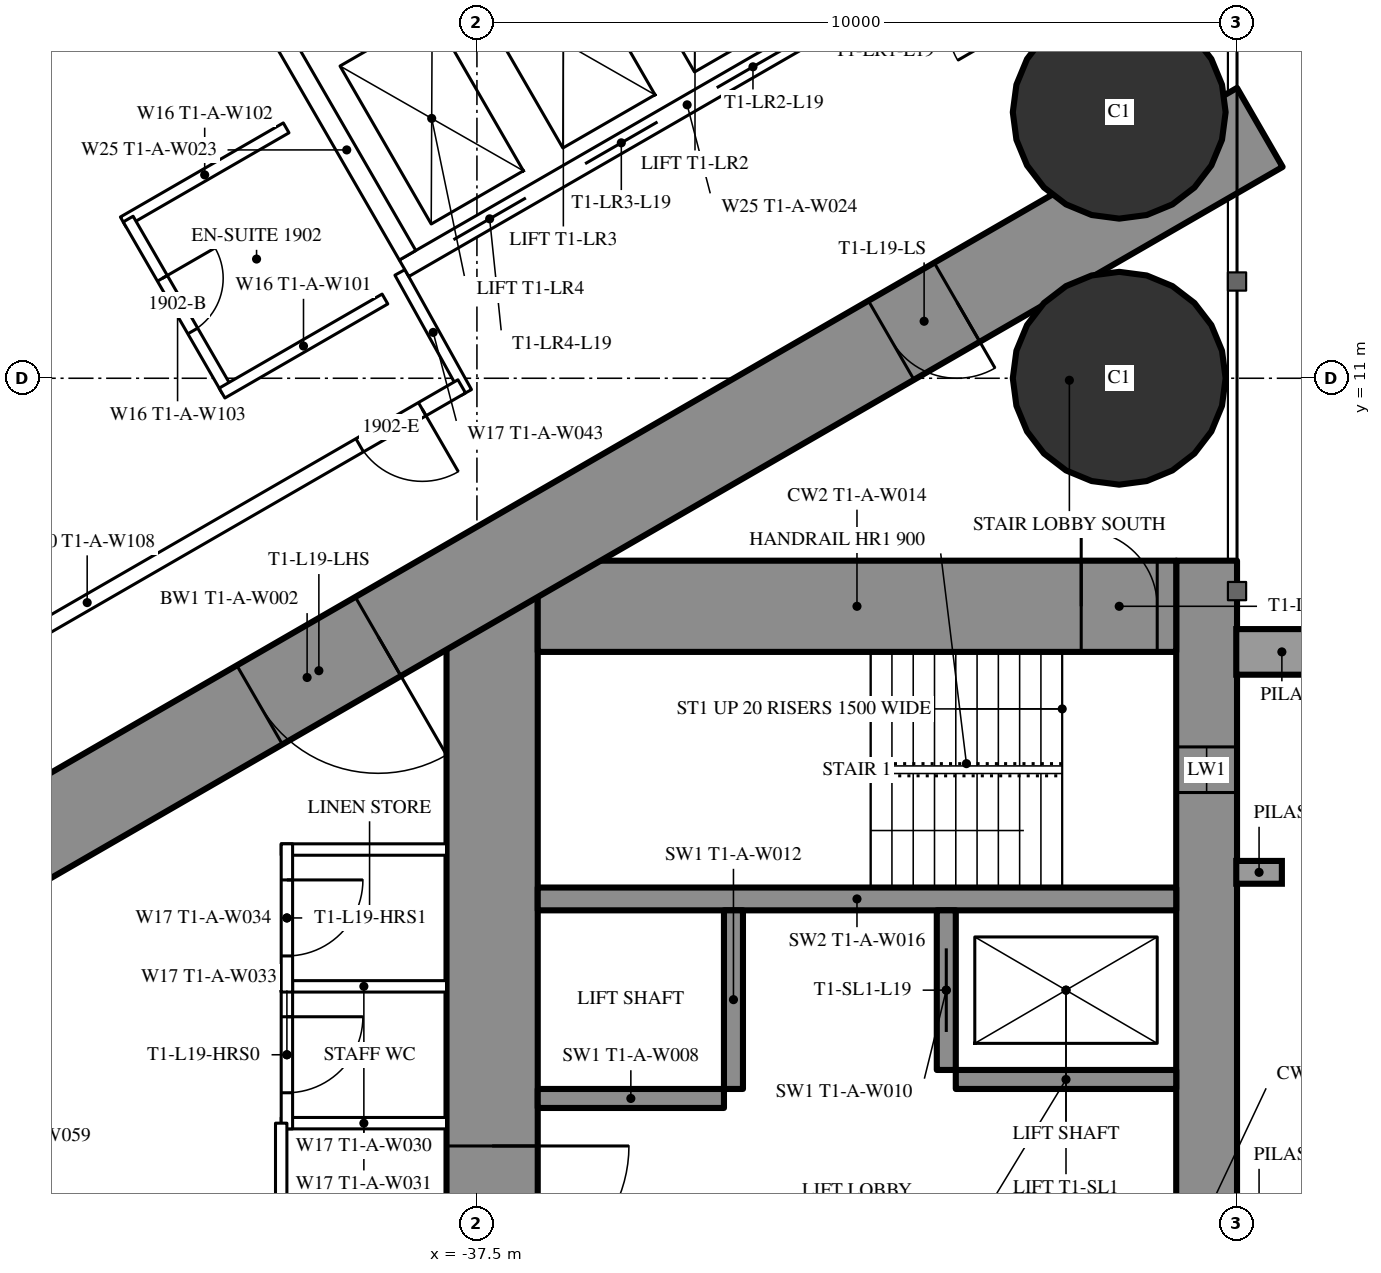
"""IFC4 building model, lengths in metres.
Left out: names, types, materials, properties, quantities, classifications, styles, units other than length and angle.
Written with IfcOpenShell. Run it as: python <this file> out.ifc"""

import sys

from ifc_helpers import new_model, si_unit, direction, frame, frame_2d, origin, origin_2d, place, context, subcontext, project, spatial, rectangle, hollow_circle, extrude, element, fill, save


model = new_model("IFC4")
c1 = context("Model", 3, precision=1e-05, world=origin(), true_north=direction((0.0, 1.0)))
c2 = subcontext(c1, "Body", "Model", "MODEL_VIEW")
j1 = project(units=[si_unit("LENGTHUNIT", "METRE"), si_unit("PLANEANGLEUNIT", "RADIAN")], contexts=[c1])
p1 = place(None, origin())
s1 = spatial("IfcSite", under=j1, at=p1, CompositionType="ELEMENT")
p2 = place(p1, origin())
s2 = spatial("IfcBuilding", under=s1, at=p2, CompositionType="ELEMENT")
p3 = place(p2, frame((0.0, 0.0, 74.0)))
s3 = spatial("IfcBuildingStorey", under=s2, at=p3, CompositionType="ELEMENT", Elevation=74.0)
for number, where, z_axis, x_axis in (
    (1, (-29.05, 11.0, 0.0), (0.0, 0.0, 1.0), (1.0, 0.0, 0.0)),
    (2, (-29.05, 14.5, 0.0), (0.0, 0.0, 1.0), (1.0, 0.0, 0.0)),
):
    element("IfcColumn", number, at=place(p3, frame(where, z_axis=z_axis, x_axis=x_axis)), inside=s3, PredefinedType="COLUMN", context=c2, shape_type="SweptSolid", body=[
        extrude(hollow_circle(Radius=1.4, WallThickness=0.12, at=origin_2d()), origin(), (0.0, 0.0, 1.0), 3.5),
    ])
p4 = place(p3, frame((-27.9, 8.6, 0.0), z_axis=(0.0, 0.0, 1.0), x_axis=(0.0, -1.0, 0.0)))
e3 = element("IfcWall", 3, at=p4, inside=s3, PredefinedType="SHEAR", context=c2, shape_type="SweptSolid", body=[
    extrude(rectangle(XDim=17.2, YDim=0.8, at=frame_2d((8.6, 0.0))), origin(), (0.0, 0.0, 1.0), 3.5),
])
p5 = place(p4, frame((2.45, 0.0, 0.6)))
e4 = element("IfcOpeningElement", 4, at=p5, cuts=e3, PredefinedType="OPENING", context=c2, shape_type="SweptSolid", body=[
    extrude(rectangle(XDim=0.6, YDim=2.1, at=frame_2d((0.3, 1.05))), frame((0.0, 0.41, 0.0), z_axis=(0.0, -1.0, 0.0), x_axis=(1.0, 0.0, 0.0)), (0.0, 0.0, 1.0), 0.82),
])
p6 = place(p4, frame((14.15, 0.0, 0.6)))
e5 = element("IfcOpeningElement", 5, at=p6, cuts=e3, PredefinedType="OPENING", context=c2, shape_type="SweptSolid", body=[
    extrude(rectangle(XDim=0.6, YDim=2.1, at=frame_2d((0.3, 1.05))), frame((0.0, 0.41, 0.0), z_axis=(0.0, -1.0, 0.0), x_axis=(1.0, 0.0, 0.0)), (0.0, 0.0, 1.0), 0.82),
])
p7 = place(p3, frame((-37.3, 8.6, 0.0), z_axis=(0.0, 0.0, 1.0), x_axis=(0.0, -1.0, 0.0)))
e6 = element("IfcWall", 6, at=p7, inside=s3, PredefinedType="SHEAR", context=c2, shape_type="SweptSolid", body=[
    extrude(rectangle(XDim=17.2, YDim=1.2, at=frame_2d((8.6, 0.0))), origin(), (0.0, 0.0, 1.0), 3.5),
])
p8 = place(p7, frame((7.7, 0.0, 0.0)))
e7 = element("IfcOpeningElement", 7, at=p8, cuts=e6, PredefinedType="OPENING", context=c2, shape_type="SweptSolid", body=[
    extrude(rectangle(XDim=1.8, YDim=2.2, at=frame_2d((0.9, 1.1))), frame((0.0, 0.61, 0.0), z_axis=(0.0, -1.0, 0.0), x_axis=(1.0, 0.0, 0.0)), (0.0, 0.0, 1.0), 1.22),
])
p9 = place(p3, frame((-28.3, 8.0, 0.0), z_axis=(0.0, 0.0, 1.0), x_axis=(-1.0, 0.0, 0.0)))
e8 = element("IfcWall", 8, at=p9, inside=s3, PredefinedType="SHEAR", context=c2, shape_type="SweptSolid", body=[
    extrude(rectangle(XDim=8.4, YDim=1.2, at=frame_2d((4.2, 0.0))), origin(), (0.0, 0.0, 1.0), 3.5),
])
p10 = place(p9, frame((0.25, 0.0, 0.0)))
e9 = element("IfcOpeningElement", 9, at=p10, cuts=e8, PredefinedType="OPENING", context=c2, shape_type="SweptSolid", body=[
    extrude(rectangle(XDim=1.0, YDim=2.2, at=frame_2d((0.5, 1.1))), frame((0.0, 0.61, 0.0), z_axis=(0.0, -1.0, 0.0), x_axis=(1.0, 0.0, 0.0)), (0.0, 0.0, 1.0), 1.22),
])
p11 = place(p3, frame((-28.3, 4.15, 0.0), z_axis=(0.0, 0.0, 1.0), x_axis=(-1.0, 0.0, 0.0)))
e10 = element("IfcWall", 10, at=p11, inside=s3, PredefinedType="SHEAR", context=c2, shape_type="SweptSolid", body=[
    extrude(rectangle(XDim=8.4, YDim=0.3, at=frame_2d((4.2, 0.0))), origin(), (0.0, 0.0, 1.0), 3.5),
])
p12 = place(p3, frame((-31.325, 4.0, 0.0), z_axis=(0.0, 0.0, 1.0), x_axis=(0.0, -1.0, 0.0)))
e11 = element("IfcWall", 11, at=p12, inside=s3, PredefinedType="SHEAR", context=c2, shape_type="SweptSolid", body=[
    extrude(rectangle(XDim=2.1, YDim=0.25, at=frame_2d((1.05, 0.0))), origin(), (0.0, 0.0, 1.0), 3.5),
])
p13 = place(p12, frame((0.5, 0.0, 0.0)))
e12 = element("IfcOpeningElement", 12, at=p13, cuts=e11, PredefinedType="OPENING", context=c2, shape_type="SweptSolid", body=[
    extrude(rectangle(XDim=1.1, YDim=2.2, at=frame_2d((0.55, 1.1))), frame((0.0, 0.135, 0.0), z_axis=(0.0, -1.0, 0.0), x_axis=(1.0, 0.0, 0.0)), (0.0, 0.0, 1.0), 0.27),
])
p14 = place(p3, frame((-34.125, 4.0, 0.0), z_axis=(0.0, 0.0, 1.0), x_axis=(0.0, -1.0, 0.0)))
e13 = element("IfcWall", 13, at=p14, inside=s3, PredefinedType="SHEAR", context=c2, shape_type="SweptSolid", body=[
    extrude(rectangle(XDim=2.35, YDim=0.25, at=frame_2d((1.175, 0.0))), origin(), (0.0, 0.0, 1.0), 3.5),
])
p15 = place(p3, frame((-28.3, 1.775, 0.0), z_axis=(0.0, 0.0, 1.0), x_axis=(-1.0, 0.0, 0.0)))
e14 = element("IfcWall", 14, at=p15, inside=s3, PredefinedType="SHEAR", context=c2, shape_type="SweptSolid", body=[
    extrude(rectangle(XDim=2.9, YDim=0.25, at=frame_2d((1.45, 0.0))), origin(), (0.0, 0.0, 1.0), 3.5),
])
p16 = place(p3, frame((-34.25, 1.525, 0.0), z_axis=(0.0, 0.0, 1.0), x_axis=(-1.0, 0.0, 0.0)))
e15 = element("IfcWall", 15, at=p16, inside=s3, PredefinedType="SHEAR", context=c2, shape_type="SweptSolid", body=[
    extrude(rectangle(XDim=2.45, YDim=0.25, at=frame_2d((1.225, 0.0))), origin(), (0.0, 0.0, 1.0), 3.5),
])
p17 = place(p3, frame((-27.2, 14.3, 0.0), z_axis=(0.0, 0.0, 1.0), x_axis=(-0.866026593062, -0.499997940104, 0.0)))
e16 = element("IfcWall", 16, at=p17, inside=s3, PredefinedType="SHEAR", context=c2, shape_type="SweptSolid", body=[
    extrude(rectangle(XDim=28.946, YDim=1.2, at=frame_2d((14.473, 0.0))), origin(), (0.0, 0.0, 1.0), 3.5),
])
p18 = place(p17, frame((4.6, 0.0, 0.0)))
e17 = element("IfcOpeningElement", 17, at=p18, cuts=e16, PredefinedType="OPENING", context=c2, shape_type="SweptSolid", body=[
    extrude(rectangle(XDim=1.0, YDim=2.2, at=frame_2d((0.5, 1.1))), frame((0.0, 0.61, 0.0), z_axis=(0.0, -1.0, 0.0), x_axis=(1.0, 0.0, 0.0)), (0.0, 0.0, 1.0), 1.22),
])
p19 = place(p17, frame((13.395, 0.0, 0.0)))
e18 = element("IfcOpeningElement", 18, at=p19, cuts=e16, PredefinedType="OPENING", context=c2, shape_type="SweptSolid", body=[
    extrude(rectangle(XDim=1.8, YDim=2.2, at=frame_2d((0.9, 1.1))), frame((0.0, 0.61, 0.0), z_axis=(0.0, -1.0, 0.0), x_axis=(1.0, 0.0, 0.0)), (0.0, 0.0, 1.0), 1.22),
])
p20 = place(p3, frame((-27.572, 16.741, 0.0), z_axis=(0.0, 0.0, 1.0), x_axis=(-0.866034618596, -0.499984039138, 0.0)))
e19 = element("IfcWall", 19, at=p20, inside=s3, PredefinedType="PARTITIONING", context=c2, shape_type="SweptSolid", body=[
    extrude(rectangle(XDim=2.854, YDim=0.2, at=frame_2d((1.427, 0.0))), origin(), (0.0, 0.0, 1.0), 3.25),
])
p21 = place(p3, frame((-38.513, 12.392, 0.0), z_axis=(0.0, 0.0, 1.0), x_axis=(0.485585508183, -0.874189175317, 0.0)))
e20 = element("IfcWall", 20, at=p21, inside=s3, PredefinedType="PARTITIONING", context=c2, shape_type="SweptSolid", body=[
    extrude(rectangle(XDim=1.805, YDim=0.15, at=frame_2d((0.902, 0.0))), origin(), (0.0, 0.0, 1.0), 3.25),
])
p22 = place(p3, frame((-30.033, 15.205, 0.0), z_axis=(0.0, 0.0, 1.0), x_axis=(-0.499980071345, 0.866036909293, 0.0)))
e21 = element("IfcWall", 21, at=p22, inside=s3, PredefinedType="PARTITIONING", context=c2, shape_type="SweptSolid", body=[
    extrude(rectangle(XDim=1.805, YDim=0.15, at=frame_2d((0.902, 0.0))), origin(), (0.0, 0.0, 1.0), 3.25),
])
p23 = place(p22, frame((0.552, 0.0, 0.0)))
e22 = element("IfcOpeningElement", 22, at=p23, cuts=e21, PredefinedType="OPENING", context=c2, shape_type="SweptSolid", body=[
    extrude(rectangle(XDim=1.0, YDim=2.2, at=frame_2d((0.5, 1.1))), frame((0.0, 0.085, 0.0), z_axis=(0.0, -1.0, 0.0), x_axis=(1.0, 0.0, 0.0)), (0.0, 0.0, 1.0), 0.17),
])
p24 = place(p3, frame((-37.7, 10.894, 0.0), z_axis=(0.0, 0.0, 1.0), x_axis=(-0.866024459167, -0.500001636122, 0.0)))
e23 = element("IfcWall", 23, at=p24, inside=s3, PredefinedType="PARTITIONING", context=c2, shape_type="SweptSolid", body=[
    extrude(rectangle(XDim=11.38, YDim=0.2, at=frame_2d((5.69, 0.0))), origin(), (0.0, 0.0, 1.0), 3.25),
])
p25 = place(p24, frame((0.6, 0.0, 0.0)))
e24 = element("IfcOpeningElement", 24, at=p25, cuts=e23, PredefinedType="OPENING", context=c2, shape_type="SweptSolid", body=[
    extrude(rectangle(XDim=0.95, YDim=2.2, at=frame_2d((0.475, 1.1))), frame((0.0, 0.11, 0.0), z_axis=(0.0, -1.0, 0.0), x_axis=(1.0, 0.0, 0.0)), (0.0, 0.0, 1.0), 0.22),
])
p26 = place(p3, frame((-40.01, 14.294, 0.0), z_axis=(0.0, 0.0, 1.0), x_axis=(-0.866031185235, -0.4999899861, 0.0)))
e25 = element("IfcWall", 25, at=p26, inside=s3, PredefinedType="PARTITIONING", context=c2, shape_type="SweptSolid", body=[
    extrude(rectangle(XDim=2.475, YDim=0.15, at=frame_2d((1.238, 0.0))), origin(), (0.0, 0.0, 1.0), 3.25),
])
p27 = place(p3, frame((-40.788, 10.843, 0.0), z_axis=(0.0, 0.0, 1.0), x_axis=(-0.500006934395, 0.866021400173, 0.0)))
e26 = element("IfcWall", 26, at=p27, inside=s3, PredefinedType="PARTITIONING", context=c2, shape_type="SweptSolid", body=[
    extrude(rectangle(XDim=2.6, YDim=0.15, at=frame_2d((1.3, 0.0))), origin(), (0.0, 0.0, 1.0), 3.25),
])
p28 = place(p27, frame((0.9, 0.0, 0.0)))
e27 = element("IfcOpeningElement", 27, at=p28, cuts=e26, PredefinedType="OPENING", context=c2, shape_type="SweptSolid", body=[
    extrude(rectangle(XDim=0.8, YDim=2.2, at=frame_2d((0.4, 1.1))), frame((0.0, 0.085, 0.0), z_axis=(0.0, -1.0, 0.0), x_axis=(1.0, 0.0, 0.0)), (0.0, 0.0, 1.0), 0.17),
])
p29 = place(p3, frame((-38.71, 12.042, 0.0), z_axis=(0.0, 0.0, 1.0), x_axis=(-0.86604923931, -0.499958713387, 0.0)))
e28 = element("IfcWall", 28, at=p29, inside=s3, PredefinedType="PARTITIONING", context=c2, shape_type="SweptSolid", body=[
    extrude(rectangle(XDim=2.475, YDim=0.15, at=frame_2d((1.237, 0.0))), origin(), (0.0, 0.0, 1.0), 3.25),
])
for number, where, z_axis, x_axis in (
    (29, (-37.9, 1.2, 0.0), (0.0, 0.0, 1.0), (-1.0, 0.0, 0.0)),
    (30, (-37.9, 3.0, 0.0), (0.0, 0.0, 1.0), (-1.0, 0.0, 0.0)),
    (31, (-37.9, 4.8, 0.0), (0.0, 0.0, 1.0), (-1.0, 0.0, 0.0)),
):
    element("IfcWall", number, at=place(p3, frame(where, z_axis=z_axis, x_axis=x_axis)), inside=s3, PredefinedType="PARTITIONING", context=c2, shape_type="SweptSolid", body=[
        extrude(rectangle(XDim=2.175, YDim=0.15, at=frame_2d((1.087, 0.0))), origin(), (0.0, 0.0, 1.0), 3.25),
    ])
p30 = place(p3, frame((-40.0, 3.075, 0.0), z_axis=(0.0, 0.0, 1.0), x_axis=(0.0, -1.0, 0.0)))
e32 = element("IfcWall", 32, at=p30, inside=s3, PredefinedType="PARTITIONING", context=c2, shape_type="SweptSolid", body=[
    extrude(rectangle(XDim=1.95, YDim=0.15, at=frame_2d((0.975, 0.0))), origin(), (0.0, 0.0, 1.0), 3.25),
])
p31 = place(p30, frame((0.475, 0.0, 0.0)))
e33 = element("IfcOpeningElement", 33, at=p31, cuts=e32, PredefinedType="OPENING", context=c2, shape_type="SweptSolid", body=[
    extrude(rectangle(XDim=1.0, YDim=2.2, at=frame_2d((0.5, 1.1))), frame((0.0, 0.085, 0.0), z_axis=(0.0, -1.0, 0.0), x_axis=(1.0, 0.0, 0.0)), (0.0, 0.0, 1.0), 0.17),
])
p32 = place(p3, frame((-40.0, 4.875, 0.0), z_axis=(0.0, 0.0, 1.0), x_axis=(0.0, -1.0, 0.0)))
e34 = element("IfcWall", 34, at=p32, inside=s3, PredefinedType="PARTITIONING", context=c2, shape_type="SweptSolid", body=[
    extrude(rectangle(XDim=1.95, YDim=0.15, at=frame_2d((0.975, 0.0))), origin(), (0.0, 0.0, 1.0), 3.25),
])
p33 = place(p32, frame((0.475, 0.0, 0.0)))
e35 = element("IfcOpeningElement", 35, at=p33, cuts=e34, PredefinedType="OPENING", context=c2, shape_type="SweptSolid", body=[
    extrude(rectangle(XDim=1.0, YDim=2.2, at=frame_2d((0.5, 1.1))), frame((0.0, 0.085, 0.0), z_axis=(0.0, -1.0, 0.0), x_axis=(1.0, 0.0, 0.0)), (0.0, 0.0, 1.0), 0.17),
])
p34 = place(p3, frame((-40.075, 1.2, 0.0), z_axis=(0.0, 0.0, 1.0), x_axis=(0.0, -1.0, 0.0)))
e36 = element("IfcWall", 36, at=p34, inside=s3, PredefinedType="PARTITIONING", context=c2, shape_type="SweptSolid", body=[
    extrude(rectangle(XDim=7.374, YDim=0.15, at=frame_2d((3.687, 0.0))), origin(), (0.0, 0.0, 1.0), 3.25),
])
p35 = place(p34, frame((2.787, 0.0, 0.0)))
e37 = element("IfcOpeningElement", 37, at=p35, cuts=e36, PredefinedType="OPENING", context=c2, shape_type="SweptSolid", body=[
    extrude(rectangle(XDim=1.8, YDim=2.2, at=frame_2d((0.9, 1.1))), frame((0.0, 0.085, 0.0), z_axis=(0.0, -1.0, 0.0), x_axis=(1.0, 0.0, 0.0)), (0.0, 0.0, 1.0), 0.17),
])
p36 = place(p3, frame((-31.01, 16.747, 0.0), z_axis=(0.0, 0.0, 1.0), x_axis=(-0.866028165386, -0.499995216735, 0.0)))
e38 = element("IfcWall", 38, at=p36, inside=s3, PredefinedType="PARTITIONING", context=c2, shape_type="SweptSolid", body=[
    extrude(rectangle(XDim=8.6, YDim=0.25, at=frame_2d((4.3, 0.0))), origin(), (0.0, 0.0, 1.0), 3.25),
])
p37 = place(p36, frame((0.75, 0.0, 0.0)))
e39 = element("IfcOpeningElement", 39, at=p37, cuts=e38, PredefinedType="OPENING", context=c2, shape_type="SweptSolid", body=[
    extrude(rectangle(XDim=1.1, YDim=2.2, at=frame_2d((0.55, 1.1))), frame((0.0, 0.135, 0.0), z_axis=(0.0, -1.0, 0.0), x_axis=(1.0, 0.0, 0.0)), (0.0, 0.0, 1.0), 0.27),
])
p38 = place(p36, frame((2.75, 0.0, 0.0)))
e40 = element("IfcOpeningElement", 40, at=p38, cuts=e38, PredefinedType="OPENING", context=c2, shape_type="SweptSolid", body=[
    extrude(rectangle(XDim=1.1, YDim=2.2, at=frame_2d((0.55, 1.1))), frame((0.0, 0.135, 0.0), z_axis=(0.0, -1.0, 0.0), x_axis=(1.0, 0.0, 0.0)), (0.0, 0.0, 1.0), 0.27),
])
p39 = place(p36, frame((4.75, 0.0, 0.0)))
e41 = element("IfcOpeningElement", 41, at=p39, cuts=e38, PredefinedType="OPENING", context=c2, shape_type="SweptSolid", body=[
    extrude(rectangle(XDim=1.1, YDim=2.2, at=frame_2d((0.55, 1.1))), frame((0.0, 0.135, 0.0), z_axis=(0.0, -1.0, 0.0), x_axis=(1.0, 0.0, 0.0)), (0.0, 0.0, 1.0), 0.27),
])
p40 = place(p36, frame((6.75, 0.0, 0.0)))
e42 = element("IfcOpeningElement", 42, at=p40, cuts=e38, PredefinedType="OPENING", context=c2, shape_type="SweptSolid", body=[
    extrude(rectangle(XDim=1.1, YDim=2.2, at=frame_2d((0.55, 1.1))), frame((0.0, 0.135, 0.0), z_axis=(0.0, -1.0, 0.0), x_axis=(1.0, 0.0, 0.0)), (0.0, 0.0, 1.0), 0.27),
])
p41 = place(p3, frame((-38.413, 12.618, 0.0), z_axis=(0.0, 0.0, 1.0), x_axis=(-0.499872130319, 0.866099216793, 0.0)))
e43 = element("IfcWall", 43, at=p41, inside=s3, PredefinedType="PARTITIONING", context=c2, shape_type="SweptSolid", body=[
    extrude(rectangle(XDim=3.2, YDim=0.25, at=frame_2d((1.6, 0.0))), origin(), (0.0, 0.0, 1.0), 3.25),
])
p42 = place(p28, origin())
e44 = element("IfcDoor", 44, at=p42, inside=s3, OperationType="SINGLE_SWING_RIGHT", PredefinedType="DOOR", context=c2, shape_type="SweptSolid", body=[
    extrude(rectangle(XDim=0.8, YDim=2.2, at=frame_2d((0.4, 1.1))), frame((0.0, 0.025, 0.0), z_axis=(0.0, -1.0, 0.0), x_axis=(1.0, 0.0, 0.0)), (0.0, 0.0, 1.0), 0.05),
])
fill(e27, e44)
p43 = place(p25, origin())
e45 = element("IfcDoor", 45, at=p43, inside=s3, OperationType="SINGLE_SWING_LEFT", PredefinedType="DOOR", context=c2, shape_type="SweptSolid", body=[
    extrude(rectangle(XDim=0.95, YDim=2.2, at=frame_2d((0.475, 1.1))), frame((0.0, 0.025, 0.0), z_axis=(0.0, -1.0, 0.0), x_axis=(1.0, 0.0, 0.0)), (0.0, 0.0, 1.0), 0.05),
])
fill(e24, e45)
p44 = place(p31, origin())
e46 = element("IfcDoor", 46, at=p44, inside=s3, OperationType="SINGLE_SWING_LEFT", PredefinedType="DOOR", context=c2, shape_type="SweptSolid", body=[
    extrude(rectangle(XDim=1.0, YDim=2.2, at=frame_2d((0.5, 1.1))), frame((0.0, 0.025, 0.0), z_axis=(0.0, -1.0, 0.0), x_axis=(1.0, 0.0, 0.0)), (0.0, 0.0, 1.0), 0.05),
])
fill(e33, e46)
p45 = place(p33, origin())
e47 = element("IfcDoor", 47, at=p45, inside=s3, OperationType="SINGLE_SWING_LEFT", PredefinedType="DOOR", context=c2, shape_type="SweptSolid", body=[
    extrude(rectangle(XDim=1.0, YDim=2.2, at=frame_2d((0.5, 1.1))), frame((0.0, 0.025, 0.0), z_axis=(0.0, -1.0, 0.0), x_axis=(1.0, 0.0, 0.0)), (0.0, 0.0, 1.0), 0.05),
])
fill(e35, e47)
p46 = place(p18, origin())
e48 = element("IfcDoor", 48, at=p46, inside=s3, OperationType="SINGLE_SWING_LEFT", PredefinedType="DOOR", context=c2, shape_type="SweptSolid", body=[
    extrude(rectangle(XDim=1.0, YDim=2.2, at=frame_2d((0.5, 1.1))), frame((0.0, 0.025, 0.0), z_axis=(0.0, -1.0, 0.0), x_axis=(1.0, 0.0, 0.0)), (0.0, 0.0, 1.0), 0.05),
])
fill(e17, e48)
p47 = place(p19, origin())
e49 = element("IfcDoor", 49, at=p47, inside=s3, OperationType="DOUBLE_DOOR_SINGLE_SWING", PredefinedType="DOOR", context=c2, shape_type="SweptSolid", body=[
    extrude(rectangle(XDim=1.8, YDim=2.2, at=frame_2d((0.9, 1.1))), frame((0.0, 0.025, 0.0), z_axis=(0.0, -1.0, 0.0), x_axis=(1.0, 0.0, 0.0)), (0.0, 0.0, 1.0), 0.05),
])
fill(e18, e49)
p48 = place(p8, origin())
e50 = element("IfcDoor", 50, at=p48, inside=s3, OperationType="DOUBLE_DOOR_SINGLE_SWING", PredefinedType="DOOR", context=c2, shape_type="SweptSolid", body=[
    extrude(rectangle(XDim=1.8, YDim=2.2, at=frame_2d((0.9, 1.1))), frame((0.0, 0.025, 0.0), z_axis=(0.0, -1.0, 0.0), x_axis=(1.0, 0.0, 0.0)), (0.0, 0.0, 1.0), 0.05),
])
fill(e7, e50)
p49 = place(p10, origin())
e51 = element("IfcDoor", 51, at=p49, inside=s3, OperationType="SINGLE_SWING_RIGHT", PredefinedType="DOOR", context=c2, shape_type="SweptSolid", body=[
    extrude(rectangle(XDim=1.0, YDim=2.2, at=frame_2d((0.5, 1.1))), frame((0.0, 0.025, 0.0), z_axis=(0.0, -1.0, 0.0), x_axis=(1.0, 0.0, 0.0)), (0.0, 0.0, 1.0), 0.05),
])
fill(e9, e51)
p50 = place(p13, origin())
e52 = element("IfcDoor", 52, at=p50, inside=s3, OperationType="SLIDING_TO_LEFT", PredefinedType="USERDEFINED", context=c2, shape_type="SweptSolid", body=[
    extrude(rectangle(XDim=1.1, YDim=2.2, at=frame_2d((0.55, 1.1))), frame((0.0, 0.025, 0.0), z_axis=(0.0, -1.0, 0.0), x_axis=(1.0, 0.0, 0.0)), (0.0, 0.0, 1.0), 0.05),
])
fill(e12, e52)
p51 = place(p38, origin())
e53 = element("IfcDoor", 53, at=p51, inside=s3, OperationType="DOUBLE_DOOR_SLIDING", PredefinedType="USERDEFINED", context=c2, shape_type="SweptSolid", body=[
    extrude(rectangle(XDim=1.1, YDim=2.2, at=frame_2d((0.55, 1.1))), frame((0.0, 0.025, 0.0), z_axis=(0.0, -1.0, 0.0), x_axis=(1.0, 0.0, 0.0)), (0.0, 0.0, 1.0), 0.05),
])
fill(e40, e53)
p52 = place(p39, origin())
e54 = element("IfcDoor", 54, at=p52, inside=s3, OperationType="DOUBLE_DOOR_SLIDING", PredefinedType="USERDEFINED", context=c2, shape_type="SweptSolid", body=[
    extrude(rectangle(XDim=1.1, YDim=2.2, at=frame_2d((0.55, 1.1))), frame((0.0, 0.025, 0.0), z_axis=(0.0, -1.0, 0.0), x_axis=(1.0, 0.0, 0.0)), (0.0, 0.0, 1.0), 0.05),
])
fill(e41, e54)
p53 = place(p40, origin())
e55 = element("IfcDoor", 55, at=p53, inside=s3, OperationType="DOUBLE_DOOR_SLIDING", PredefinedType="USERDEFINED", context=c2, shape_type="SweptSolid", body=[
    extrude(rectangle(XDim=1.1, YDim=2.2, at=frame_2d((0.55, 1.1))), frame((0.0, 0.025, 0.0), z_axis=(0.0, -1.0, 0.0), x_axis=(1.0, 0.0, 0.0)), (0.0, 0.0, 1.0), 0.05),
])
fill(e42, e55)
p54 = place(p5, origin())
e56 = element("IfcWindow", 56, at=p54, inside=s3, PartitioningType="SINGLE_PANEL", PredefinedType="WINDOW", context=c2, shape_type="SweptSolid", body=[
    extrude(rectangle(XDim=0.6, YDim=2.1, at=frame_2d((0.3, 1.05))), frame((0.0, 0.03, 0.0), z_axis=(0.0, -1.0, 0.0), x_axis=(1.0, 0.0, 0.0)), (0.0, 0.0, 1.0), 0.06),
])
fill(e4, e56)
save(model, sys.argv[1])
